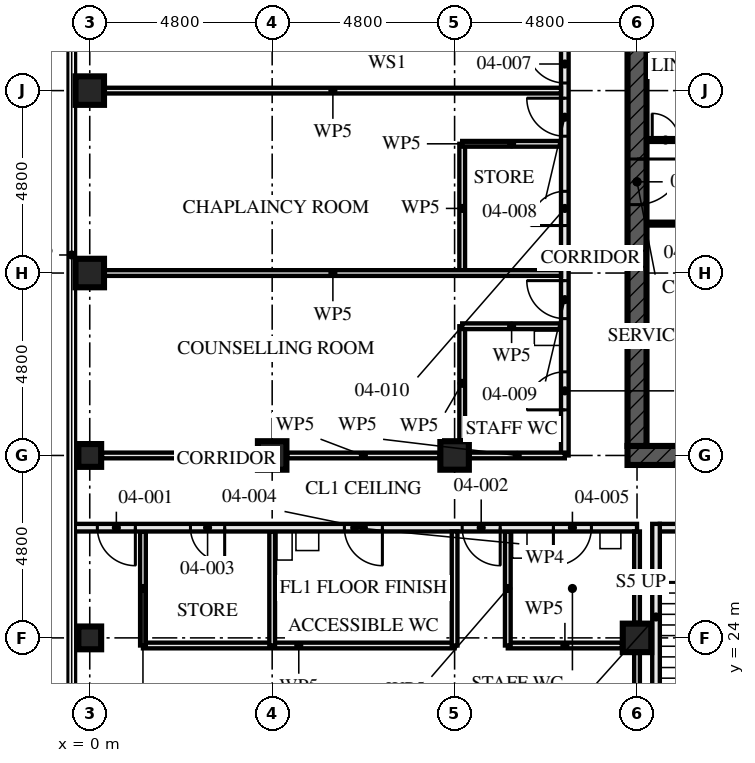
"""IFC4 building model, lengths in metres.
Left out: names, types, materials, properties, quantities, classifications, styles, units other than length and angle.
Written with IfcOpenShell. Run it as: python <this file> out.ifc"""

import sys

from ifc_helpers import new_model, si_unit, direction, frame, frame_2d, origin, origin_2d, place, context, subcontext, project, spatial, rectangle, hollow_rectangle, extrude, element, fill, save


model = new_model("IFC4")
c1 = context("Model", 3, precision=1e-05, world=origin(), true_north=direction((0.0, 1.0)))
c2 = subcontext(c1, "Body", "Model", "MODEL_VIEW")
j1 = project(units=[si_unit("LENGTHUNIT", "METRE"), si_unit("PLANEANGLEUNIT", "RADIAN")], contexts=[c1])
p1 = place(None, origin())
s1 = spatial("IfcSite", under=j1, at=p1, CompositionType="ELEMENT")
p2 = place(p1, origin())
s2 = spatial("IfcBuilding", under=s1, at=p2, CompositionType="ELEMENT")
p3 = place(p2, frame((0.0, 0.0, 18.0)))
s3 = spatial("IfcBuildingStorey", under=s2, at=p3, CompositionType="ELEMENT", Elevation=18.0)
for number, where, z_axis, x_axis in (
    (1, (0.0, 24.0, 0.0), (0.0, 0.0, 1.0), (1.0, 0.0, 0.0)),
    (2, (0.0, 28.8, 0.0), (0.0, 0.0, 1.0), (0.0, 1.0, 0.0)),
):
    element("IfcColumn", number, at=place(p3, frame(where, z_axis=z_axis, x_axis=x_axis)), inside=s3, PredefinedType="COLUMN", context=c2, shape_type="SweptSolid", body=[
        extrude(hollow_rectangle(XDim=0.6, YDim=0.6, WallThickness=0.08, at=origin_2d()), origin(), (0.0, 0.0, 1.0), 4.5),
    ])
for number, where, z_axis, x_axis in (
    (3, (0.0, 33.6, 0.0), (0.0, 0.0, 1.0), (1.0, 0.0, 0.0)),
    (4, (0.0, 38.4, 0.0), (0.0, 0.0, 1.0), (1.0, 0.0, 0.0)),
    (5, (4.8, 28.8, 0.0), (0.0, 0.0, 1.0), (0.0, 1.0, 0.0)),
    (6, (9.6, 28.8, 0.0), (0.0, 0.0, 1.0), (0.0, 1.0, 0.0)),
    (7, (14.4, 24.0, 0.0), (0.0, 0.0, 1.0), (1.0, 0.0, 0.0)),
):
    element("IfcColumn", number, at=place(p3, frame(where, z_axis=z_axis, x_axis=x_axis)), inside=s3, PredefinedType="COLUMN", context=c2, shape_type="SweptSolid", body=[
        extrude(hollow_rectangle(XDim=0.75, YDim=0.75, WallThickness=0.08, at=origin_2d()), origin(), (0.0, 0.0, 1.0), 4.5),
    ])
p4 = place(p3, frame((14.15, 28.8, -0.17), z_axis=(0.0, 0.0, 1.0), x_axis=(1.0, 0.0, 0.0)))
e8 = element("IfcWall", 8, at=p4, inside=s3, PredefinedType="SHEAR", context=c2, shape_type="SweptSolid", body=[
    extrude(rectangle(XDim=14.9, YDim=0.5, at=frame_2d((7.45, 0.0))), origin(), (0.0, 0.0, 1.0), 4.5),
])
p5 = place(p4, frame((6.85, 0.0, 0.17)))
e9 = element("IfcOpeningElement", 9, at=p5, cuts=e8, PredefinedType="OPENING", context=c2, shape_type="SweptSolid", body=[
    extrude(rectangle(XDim=1.2, YDim=2.1, at=frame_2d((0.6, 1.05))), frame((0.0, 0.26, 0.0), z_axis=(0.0, -1.0, 0.0), x_axis=(1.0, 0.0, 0.0)), (0.0, 0.0, 1.0), 0.521),
])
p6 = place(p3, frame((14.4, 42.95, -0.17), z_axis=(0.0, 0.0, 1.0), x_axis=(0.0, -1.0, 0.0)))
e10 = element("IfcWall", 10, at=p6, inside=s3, PredefinedType="SHEAR", context=c2, shape_type="SweptSolid", body=[
    extrude(rectangle(XDim=13.9, YDim=0.5, at=frame_2d((6.95, 0.0))), origin(), (0.0, 0.0, 1.0), 4.5),
])
p7 = place(p6, frame((6.35, 0.0, 0.17)))
e11 = element("IfcOpeningElement", 11, at=p7, cuts=e10, PredefinedType="OPENING", context=c2, shape_type="SweptSolid", body=[
    extrude(rectangle(XDim=1.2, YDim=2.1, at=frame_2d((0.6, 1.05))), frame((0.0, 0.26, 0.0), z_axis=(0.0, -1.0, 0.0), x_axis=(1.0, 0.0, 0.0)), (0.0, 0.0, 1.0), 0.521),
])
for number, where, z_axis, x_axis in (
    (12, (9.6, 23.8, 0.0), (0.0, 0.0, 1.0), (0.0, 1.0, 0.0)),
    (13, (1.4, 23.8, 0.0), (0.0, 0.0, 1.0), (0.0, 1.0, 0.0)),
):
    element("IfcWall", number, at=place(p3, frame(where, z_axis=z_axis, x_axis=x_axis)), inside=s3, PredefinedType="PARTITIONING", context=c2, shape_type="SweptSolid", body=[
        extrude(rectangle(XDim=3.0, YDim=0.15, at=frame_2d((1.5, 0.0))), origin(), (0.0, 0.0, 1.0), 3.55),
    ])
p8 = place(p3, frame((1.4, 23.8, 0.0), z_axis=(0.0, 0.0, 1.0), x_axis=(1.0, 0.0, 0.0)))
e14 = element("IfcWall", 14, at=p8, inside=s3, PredefinedType="PARTITIONING", context=c2, shape_type="SweptSolid", body=[
    extrude(rectangle(XDim=8.2, YDim=0.15, at=frame_2d((4.1, 0.0))), origin(), (0.0, 0.0, 1.0), 4.33),
])
for number, where, z_axis, x_axis in (
    (15, (4.8, 23.8, 0.0), (0.0, 0.0, 1.0), (0.0, 1.0, 0.0)),
    (16, (11.0, 23.8, 0.0), (0.0, 0.0, 1.0), (0.0, 1.0, 0.0)),
):
    element("IfcWall", number, at=place(p3, frame(where, z_axis=z_axis, x_axis=x_axis)), inside=s3, PredefinedType="PARTITIONING", context=c2, shape_type="SweptSolid", body=[
        extrude(rectangle(XDim=3.0, YDim=0.15, at=frame_2d((1.5, 0.0))), origin(), (0.0, 0.0, 1.0), 3.55),
    ])
p9 = place(p3, frame((11.0, 23.8, 0.0), z_axis=(0.0, 0.0, 1.0), x_axis=(1.0, 0.0, 0.0)))
e17 = element("IfcWall", 17, at=p9, inside=s3, PredefinedType="PARTITIONING", context=c2, shape_type="SweptSolid", body=[
    extrude(rectangle(XDim=3.005, YDim=0.15, at=frame_2d((1.502, 0.0))), origin(), (0.0, 0.0, 1.0), 4.33),
])
p10 = place(p3, frame((-0.455, 26.9, 0.0), z_axis=(0.0, 0.0, 1.0), x_axis=(1.0, 0.0, 0.0)))
e18 = element("IfcWall", 18, at=p10, inside=s3, PredefinedType="PARTITIONING", context=c2, shape_type="SweptSolid", body=[
    extrude(rectangle(XDim=14.855, YDim=0.2, at=frame_2d((7.427, 0.0))), origin(), (0.0, 0.0, 1.0), 3.32),
])
p11 = place(p10, frame((0.655, 0.0, 0.0)))
e19 = element("IfcOpeningElement", 19, at=p11, cuts=e18, PredefinedType="OPENING", context=c2, shape_type="SweptSolid", body=[
    extrude(rectangle(XDim=1.0, YDim=2.4, at=frame_2d((0.5, 1.2))), frame((0.0, 0.111, 0.0), z_axis=(0.0, -1.0, 0.0), x_axis=(1.0, 0.0, 0.0)), (0.0, 0.0, 1.0), 0.221),
])
p12 = place(p10, frame((10.255, 0.0, 0.0)))
e20 = element("IfcOpeningElement", 20, at=p12, cuts=e18, PredefinedType="OPENING", context=c2, shape_type="SweptSolid", body=[
    extrude(rectangle(XDim=1.0, YDim=2.4, at=frame_2d((0.5, 1.2))), frame((0.0, 0.111, 0.0), z_axis=(0.0, -1.0, 0.0), x_axis=(1.0, 0.0, 0.0)), (0.0, 0.0, 1.0), 0.221),
])
p13 = place(p10, frame((3.105, 0.0, 0.0)))
e21 = element("IfcOpeningElement", 21, at=p13, cuts=e18, PredefinedType="OPENING", context=c2, shape_type="SweptSolid", body=[
    extrude(rectangle(XDim=0.9, YDim=2.1, at=frame_2d((0.45, 1.05))), frame((0.0, 0.111, 0.0), z_axis=(0.0, -1.0, 0.0), x_axis=(1.0, 0.0, 0.0)), (0.0, 0.0, 1.0), 0.221),
])
p14 = place(p10, frame((7.155, 0.0, 0.0)))
e22 = element("IfcOpeningElement", 22, at=p14, cuts=e18, PredefinedType="OPENING", context=c2, shape_type="SweptSolid", body=[
    extrude(rectangle(XDim=1.0, YDim=2.1, at=frame_2d((0.5, 1.05))), frame((0.0, 0.111, 0.0), z_axis=(0.0, -1.0, 0.0), x_axis=(1.0, 0.0, 0.0)), (0.0, 0.0, 1.0), 0.221),
])
p15 = place(p10, frame((12.655, 0.0, 0.0)))
e23 = element("IfcOpeningElement", 23, at=p15, cuts=e18, PredefinedType="OPENING", context=c2, shape_type="SweptSolid", body=[
    extrude(rectangle(XDim=1.0, YDim=2.1, at=frame_2d((0.5, 1.05))), frame((0.0, 0.111, 0.0), z_axis=(0.0, -1.0, 0.0), x_axis=(1.0, 0.0, 0.0)), (0.0, 0.0, 1.0), 0.221),
])
p16 = place(p3, frame((9.8, 37.0, 0.0), z_axis=(0.0, 0.0, 1.0), x_axis=(1.0, 0.0, 0.0)))
e24 = element("IfcWall", 24, at=p16, inside=s3, PredefinedType="PARTITIONING", context=c2, shape_type="SweptSolid", body=[
    extrude(rectangle(XDim=2.6, YDim=0.15, at=frame_2d((1.3, 0.0))), origin(), (0.0, 0.0, 1.0), 4.33),
])
p17 = place(p3, frame((9.8, 37.0, 0.0), z_axis=(0.0, 0.0, 1.0), x_axis=(0.0, -1.0, 0.0)))
e25 = element("IfcWall", 25, at=p17, inside=s3, PredefinedType="PARTITIONING", context=c2, shape_type="SweptSolid", body=[
    extrude(rectangle(XDim=3.4, YDim=0.15, at=frame_2d((1.7, 0.0))), origin(), (0.0, 0.0, 1.0), 4.33),
])
p18 = place(p3, frame((9.8, 32.2, 0.0), z_axis=(0.0, 0.0, 1.0), x_axis=(1.0, 0.0, 0.0)))
e26 = element("IfcWall", 26, at=p18, inside=s3, PredefinedType="PARTITIONING", context=c2, shape_type="SweptSolid", body=[
    extrude(rectangle(XDim=2.6, YDim=0.15, at=frame_2d((1.3, 0.0))), origin(), (0.0, 0.0, 1.0), 4.33),
])
p19 = place(p3, frame((9.8, 32.2, 0.0), z_axis=(0.0, 0.0, 1.0), x_axis=(0.0, -1.0, 0.0)))
e27 = element("IfcWall", 27, at=p19, inside=s3, PredefinedType="PARTITIONING", context=c2, shape_type="SweptSolid", body=[
    extrude(rectangle(XDim=3.005, YDim=0.15, at=frame_2d((1.502, 0.0))), origin(), (0.0, 0.0, 1.0), 4.33),
])
for number, where, z_axis, x_axis in (
    (28, (0.395, 38.4, 0.0), (0.0, 0.0, 1.0), (1.0, 0.0, 0.0)),
    (29, (0.395, 33.6, 0.0), (0.0, 0.0, 1.0), (1.0, 0.0, 0.0)),
):
    element("IfcWall", number, at=place(p3, frame(where, z_axis=z_axis, x_axis=x_axis)), inside=s3, PredefinedType="PARTITIONING", context=c2, shape_type="SweptSolid", body=[
        extrude(rectangle(XDim=12.005, YDim=0.15, at=frame_2d((6.002, 0.0))), origin(), (0.0, 0.0, 1.0), 3.55),
    ])
p20 = place(p3, frame((12.5, 43.2, 0.0), z_axis=(0.0, 0.0, 1.0), x_axis=(0.0, -1.0, 0.0)))
e30 = element("IfcWall", 30, at=p20, inside=s3, PredefinedType="PARTITIONING", context=c2, shape_type="SweptSolid", body=[
    extrude(rectangle(XDim=14.4, YDim=0.2, at=frame_2d((7.2, 0.0))), origin(), (0.0, 0.0, 1.0), 3.55),
])
p21 = place(p20, frame((1.4, 0.0, 0.0)))
e31 = element("IfcOpeningElement", 31, at=p21, cuts=e30, PredefinedType="OPENING", context=c2, shape_type="SweptSolid", body=[
    extrude(rectangle(XDim=1.0, YDim=2.1, at=frame_2d((0.5, 1.05))), frame((0.0, 0.111, 0.0), z_axis=(0.0, -1.0, 0.0), x_axis=(1.0, 0.0, 0.0)), (0.0, 0.0, 1.0), 0.221),
])
p22 = place(p20, frame((3.6, 0.0, 0.0)))
e32 = element("IfcOpeningElement", 32, at=p22, cuts=e30, PredefinedType="OPENING", context=c2, shape_type="SweptSolid", body=[
    extrude(rectangle(XDim=1.0, YDim=2.4, at=frame_2d((0.5, 1.2))), frame((0.0, 0.111, 0.0), z_axis=(0.0, -1.0, 0.0), x_axis=(1.0, 0.0, 0.0)), (0.0, 0.0, 1.0), 0.221),
])
p23 = place(p20, frame((5.0, 0.0, 0.0)))
e33 = element("IfcOpeningElement", 33, at=p23, cuts=e30, PredefinedType="OPENING", context=c2, shape_type="SweptSolid", body=[
    extrude(rectangle(XDim=1.0, YDim=2.4, at=frame_2d((0.5, 1.2))), frame((0.0, 0.111, 0.0), z_axis=(0.0, -1.0, 0.0), x_axis=(1.0, 0.0, 0.0)), (0.0, 0.0, 1.0), 0.221),
])
p24 = place(p20, frame((9.8, 0.0, 0.0)))
e34 = element("IfcOpeningElement", 34, at=p24, cuts=e30, PredefinedType="OPENING", context=c2, shape_type="SweptSolid", body=[
    extrude(rectangle(XDim=1.0, YDim=2.4, at=frame_2d((0.5, 1.2))), frame((0.0, 0.111, 0.0), z_axis=(0.0, -1.0, 0.0), x_axis=(1.0, 0.0, 0.0)), (0.0, 0.0, 1.0), 0.221),
])
p25 = place(p20, frame((7.45, 0.0, 0.0)))
e35 = element("IfcOpeningElement", 35, at=p25, cuts=e30, PredefinedType="OPENING", context=c2, shape_type="SweptSolid", body=[
    extrude(rectangle(XDim=0.9, YDim=2.1, at=frame_2d((0.45, 1.05))), frame((0.0, 0.111, 0.0), z_axis=(0.0, -1.0, 0.0), x_axis=(1.0, 0.0, 0.0)), (0.0, 0.0, 1.0), 0.221),
])
p26 = place(p20, frame((12.2, 0.0, 0.0)))
e36 = element("IfcOpeningElement", 36, at=p26, cuts=e30, PredefinedType="OPENING", context=c2, shape_type="SweptSolid", body=[
    extrude(rectangle(XDim=1.0, YDim=2.1, at=frame_2d((0.5, 1.05))), frame((0.0, 0.111, 0.0), z_axis=(0.0, -1.0, 0.0), x_axis=(1.0, 0.0, 0.0)), (0.0, 0.0, 1.0), 0.221),
])
p27 = place(p3, frame((14.9, 22.1, 0.0), z_axis=(0.0, 0.0, 1.0), x_axis=(0.0, 1.0, 0.0)))
e37 = element("IfcWall", 37, at=p27, inside=s3, PredefinedType="SOLIDWALL", context=c2, shape_type="SweptSolid", body=[
    extrude(rectangle(XDim=4.9, YDim=0.2, at=frame_2d((2.45, 0.0))), origin(), (0.0, 0.0, 1.0), 3.99),
])
p28 = place(p3, frame((15.0, 26.9, 0.0), z_axis=(0.0, 0.0, 1.0), x_axis=(1.0, 0.0, 0.0)))
e38 = element("IfcWall", 38, at=p28, inside=s3, PredefinedType="SOLIDWALL", context=c2, shape_type="SweptSolid", body=[
    extrude(rectangle(XDim=2.6, YDim=0.2, at=frame_2d((1.3, 0.0))), origin(), (0.0, 0.0, 1.0), 4.33),
])
p29 = place(p28, frame((0.8, 0.0, 0.0)))
e39 = element("IfcOpeningElement", 39, at=p29, cuts=e38, PredefinedType="OPENING", context=c2, shape_type="SweptSolid", body=[
    extrude(rectangle(XDim=1.0, YDim=2.1, at=frame_2d((0.5, 1.05))), frame((0.0, 0.111, 0.0), z_axis=(0.0, -1.0, 0.0), x_axis=(1.0, 0.0, 0.0)), (0.0, 0.0, 1.0), 0.221),
])
p30 = place(p3, frame((14.65, 34.9, 0.0), z_axis=(0.0, 0.0, 1.0), x_axis=(1.0, 0.0, 0.0)))
e40 = element("IfcWall", 40, at=p30, inside=s3, PredefinedType="SOLIDWALL", context=c2, shape_type="SweptSolid", body=[
    extrude(rectangle(XDim=5.9, YDim=0.1, at=frame_2d((2.95, 0.0))), origin(), (0.0, 0.0, 1.0), 4.33),
])
p31 = place(p30, frame((1.6, 0.0, 0.0)))
e41 = element("IfcOpeningElement", 41, at=p31, cuts=e40, PredefinedType="OPENING", context=c2, shape_type="SweptSolid", body=[
    extrude(rectangle(XDim=0.7, YDim=2.1, at=frame_2d((0.35, 1.05))), frame((0.0, 0.061, 0.0), z_axis=(0.0, -1.0, 0.0), x_axis=(1.0, 0.0, 0.0)), (0.0, 0.0, 1.0), 0.121),
])
p32 = place(p3, frame((14.65, 37.1, 0.0), z_axis=(0.0, 0.0, 1.0), x_axis=(1.0, 0.0, 0.0)))
e42 = element("IfcWall", 42, at=p32, inside=s3, PredefinedType="SOLIDWALL", context=c2, shape_type="SweptSolid", body=[
    extrude(rectangle(XDim=5.9, YDim=0.1, at=frame_2d((2.95, 0.0))), origin(), (0.0, 0.0, 1.0), 4.33),
])
p33 = place(p32, frame((0.15, 0.0, 0.0)))
e43 = element("IfcOpeningElement", 43, at=p33, cuts=e42, PredefinedType="OPENING", context=c2, shape_type="SweptSolid", body=[
    extrude(rectangle(XDim=0.7, YDim=2.1, at=frame_2d((0.35, 1.05))), frame((0.0, 0.061, 0.0), z_axis=(0.0, -1.0, 0.0), x_axis=(1.0, 0.0, 0.0)), (0.0, 0.0, 1.0), 0.121),
])
p34 = place(p32, frame((1.5, 0.0, 0.0)))
e44 = element("IfcOpeningElement", 44, at=p34, cuts=e42, PredefinedType="OPENING", context=c2, shape_type="SweptSolid", body=[
    extrude(rectangle(XDim=0.9, YDim=2.1, at=frame_2d((0.45, 1.05))), frame((0.0, 0.061, 0.0), z_axis=(0.0, -1.0, 0.0), x_axis=(1.0, 0.0, 0.0)), (0.0, 0.0, 1.0), 0.121),
])
p35 = place(p3, frame((12.5, 28.8, 0.0), z_axis=(0.0, 0.0, 1.0), x_axis=(-1.0, 0.0, 0.0)))
e45 = element("IfcWall", 45, at=p35, inside=s3, PredefinedType="PARTITIONING", context=c2, shape_type="SweptSolid", body=[
    extrude(rectangle(XDim=2.505, YDim=0.15, at=frame_2d((1.252, 0.0))), origin(), (0.0, 0.0, 1.0), 3.32),
])
p36 = place(p3, frame((9.205, 28.8, 0.0), z_axis=(0.0, 0.0, 1.0), x_axis=(-1.0, 0.0, 0.0)))
e46 = element("IfcWall", 46, at=p36, inside=s3, PredefinedType="PARTITIONING", context=c2, shape_type="SweptSolid", body=[
    extrude(rectangle(XDim=4.01, YDim=0.15, at=frame_2d((2.005, 0.0))), origin(), (0.0, 0.0, 1.0), 3.32),
])
p37 = place(p3, frame((4.405, 28.8, 0.0), z_axis=(0.0, 0.0, 1.0), x_axis=(-1.0, 0.0, 0.0)))
e47 = element("IfcWall", 47, at=p37, inside=s3, PredefinedType="PARTITIONING", context=c2, shape_type="SweptSolid", body=[
    extrude(rectangle(XDim=4.085, YDim=0.15, at=frame_2d((2.042, 0.0))), origin(), (0.0, 0.0, 1.0), 3.32),
])
p38 = place(p3, frame((14.4, 19.595, 0.0), z_axis=(0.0, 0.0, 1.0), x_axis=(0.0, 1.0, 0.0)))
e48 = element("IfcWall", 48, at=p38, inside=s3, PredefinedType="PARTITIONING", context=c2, shape_type="SweptSolid", body=[
    extrude(rectangle(XDim=4.01, YDim=0.15, at=frame_2d((2.005, 0.0))), origin(), (0.0, 0.0, 1.0), 3.32),
])
p39 = place(p3, frame((14.4, 24.395, 0.0), z_axis=(0.0, 0.0, 1.0), x_axis=(0.0, 1.0, 0.0)))
e49 = element("IfcWall", 49, at=p39, inside=s3, PredefinedType="PARTITIONING", context=c2, shape_type="SweptSolid", body=[
    extrude(rectangle(XDim=2.405, YDim=0.15, at=frame_2d((1.203, 0.0))), origin(), (0.0, 0.0, 1.0), 3.32),
])
p40 = place(p11, frame((1.0, 0.0, 0.0), z_axis=(0.0, 0.0, 1.0), x_axis=(-1.0, 0.0, 0.0)))
e50 = element("IfcDoor", 50, at=p40, inside=s3, OperationType="SINGLE_SWING_RIGHT", PredefinedType="DOOR", context=c2, shape_type="SweptSolid", body=[
    extrude(rectangle(XDim=1.0, YDim=2.4, at=frame_2d((0.5, 1.2))), frame((0.0, 0.027, 0.0), z_axis=(0.0, -1.0, 0.0), x_axis=(1.0, 0.0, 0.0)), (0.0, 0.0, 1.0), 0.054),
])
fill(e19, e50)
p41 = place(p12, frame((1.0, 0.0, 0.0), z_axis=(0.0, 0.0, 1.0), x_axis=(-1.0, 0.0, 0.0)))
e51 = element("IfcDoor", 51, at=p41, inside=s3, OperationType="SINGLE_SWING_RIGHT", PredefinedType="DOOR", context=c2, shape_type="SweptSolid", body=[
    extrude(rectangle(XDim=1.0, YDim=2.4, at=frame_2d((0.5, 1.2))), frame((0.0, 0.027, 0.0), z_axis=(0.0, -1.0, 0.0), x_axis=(1.0, 0.0, 0.0)), (0.0, 0.0, 1.0), 0.054),
])
fill(e20, e51)
p42 = place(p13, frame((0.9, 0.0, 0.0), z_axis=(0.0, 0.0, 1.0), x_axis=(-1.0, 0.0, 0.0)))
e52 = element("IfcDoor", 52, at=p42, inside=s3, OperationType="SINGLE_SWING_RIGHT", PredefinedType="DOOR", context=c2, shape_type="SweptSolid", body=[
    extrude(rectangle(XDim=0.9, YDim=2.1, at=frame_2d((0.45, 1.05))), frame((0.0, 0.027, 0.0), z_axis=(0.0, -1.0, 0.0), x_axis=(1.0, 0.0, 0.0)), (0.0, 0.0, 1.0), 0.054),
])
fill(e21, e52)
p43 = place(p14, frame((1.0, 0.0, 0.0), z_axis=(0.0, 0.0, 1.0), x_axis=(-1.0, 0.0, 0.0)))
e53 = element("IfcDoor", 53, at=p43, inside=s3, OperationType="SINGLE_SWING_RIGHT", PredefinedType="DOOR", context=c2, shape_type="SweptSolid", body=[
    extrude(rectangle(XDim=1.0, YDim=2.1, at=frame_2d((0.5, 1.05))), frame((0.0, 0.027, 0.0), z_axis=(0.0, -1.0, 0.0), x_axis=(1.0, 0.0, 0.0)), (0.0, 0.0, 1.0), 0.054),
])
fill(e22, e53)
p44 = place(p15, frame((1.0, 0.0, 0.0), z_axis=(0.0, 0.0, 1.0), x_axis=(-1.0, 0.0, 0.0)))
e54 = element("IfcDoor", 54, at=p44, inside=s3, OperationType="SINGLE_SWING_LEFT", PredefinedType="DOOR", context=c2, shape_type="SweptSolid", body=[
    extrude(rectangle(XDim=1.0, YDim=2.1, at=frame_2d((0.5, 1.05))), frame((0.0, 0.027, 0.0), z_axis=(0.0, -1.0, 0.0), x_axis=(1.0, 0.0, 0.0)), (0.0, 0.0, 1.0), 0.054),
])
fill(e23, e54)
p45 = place(p22, frame((1.0, 0.0, 0.0), z_axis=(0.0, 0.0, 1.0), x_axis=(-1.0, 0.0, 0.0)))
e55 = element("IfcDoor", 55, at=p45, inside=s3, OperationType="SINGLE_SWING_LEFT", PredefinedType="DOOR", context=c2, shape_type="SweptSolid", body=[
    extrude(rectangle(XDim=1.0, YDim=2.4, at=frame_2d((0.5, 1.2))), frame((0.0, 0.027, 0.0), z_axis=(0.0, -1.0, 0.0), x_axis=(1.0, 0.0, 0.0)), (0.0, 0.0, 1.0), 0.054),
])
fill(e32, e55)
p46 = place(p23, frame((1.0, 0.0, 0.0), z_axis=(0.0, 0.0, 1.0), x_axis=(-1.0, 0.0, 0.0)))
e56 = element("IfcDoor", 56, at=p46, inside=s3, OperationType="SINGLE_SWING_LEFT", PredefinedType="DOOR", context=c2, shape_type="SweptSolid", body=[
    extrude(rectangle(XDim=1.0, YDim=2.4, at=frame_2d((0.5, 1.2))), frame((0.0, 0.027, 0.0), z_axis=(0.0, -1.0, 0.0), x_axis=(1.0, 0.0, 0.0)), (0.0, 0.0, 1.0), 0.054),
])
fill(e33, e56)
p47 = place(p24, frame((1.0, 0.0, 0.0), z_axis=(0.0, 0.0, 1.0), x_axis=(-1.0, 0.0, 0.0)))
e57 = element("IfcDoor", 57, at=p47, inside=s3, OperationType="SINGLE_SWING_LEFT", PredefinedType="DOOR", context=c2, shape_type="SweptSolid", body=[
    extrude(rectangle(XDim=1.0, YDim=2.4, at=frame_2d((0.5, 1.2))), frame((0.0, 0.027, 0.0), z_axis=(0.0, -1.0, 0.0), x_axis=(1.0, 0.0, 0.0)), (0.0, 0.0, 1.0), 0.054),
])
fill(e34, e57)
p48 = place(p25, frame((0.9, 0.0, 0.0), z_axis=(0.0, 0.0, 1.0), x_axis=(-1.0, 0.0, 0.0)))
e58 = element("IfcDoor", 58, at=p48, inside=s3, OperationType="SINGLE_SWING_RIGHT", PredefinedType="DOOR", context=c2, shape_type="SweptSolid", body=[
    extrude(rectangle(XDim=0.9, YDim=2.1, at=frame_2d((0.45, 1.05))), frame((0.0, 0.027, 0.0), z_axis=(0.0, -1.0, 0.0), x_axis=(1.0, 0.0, 0.0)), (0.0, 0.0, 1.0), 0.054),
])
fill(e35, e58)
p49 = place(p26, frame((1.0, 0.0, 0.0), z_axis=(0.0, 0.0, 1.0), x_axis=(-1.0, 0.0, 0.0)))
e59 = element("IfcDoor", 59, at=p49, inside=s3, OperationType="SINGLE_SWING_RIGHT", PredefinedType="DOOR", context=c2, shape_type="SweptSolid", body=[
    extrude(rectangle(XDim=1.0, YDim=2.1, at=frame_2d((0.5, 1.05))), frame((0.0, 0.027, 0.0), z_axis=(0.0, -1.0, 0.0), x_axis=(1.0, 0.0, 0.0)), (0.0, 0.0, 1.0), 0.054),
])
fill(e36, e59)
p50 = place(p33, origin())
e60 = element("IfcDoor", 60, at=p50, inside=s3, OperationType="SINGLE_SWING_RIGHT", PredefinedType="DOOR", context=c2, shape_type="SweptSolid", body=[
    extrude(rectangle(XDim=0.7, YDim=2.1, at=frame_2d((0.35, 1.05))), frame((0.0, 0.027, 0.0), z_axis=(0.0, -1.0, 0.0), x_axis=(1.0, 0.0, 0.0)), (0.0, 0.0, 1.0), 0.054),
])
fill(e43, e60)
p51 = place(p7, origin())
e61 = element("IfcDoor", 61, at=p51, inside=s3, OperationType="SINGLE_SWING_LEFT", PredefinedType="DOOR", context=c2, shape_type="SweptSolid", body=[
    extrude(rectangle(XDim=1.2, YDim=2.1, at=frame_2d((0.6, 1.05))), frame((0.0, 0.027, 0.0), z_axis=(0.0, -1.0, 0.0), x_axis=(1.0, 0.0, 0.0)), (0.0, 0.0, 1.0), 0.054),
])
fill(e11, e61)
save(model, sys.argv[1])
